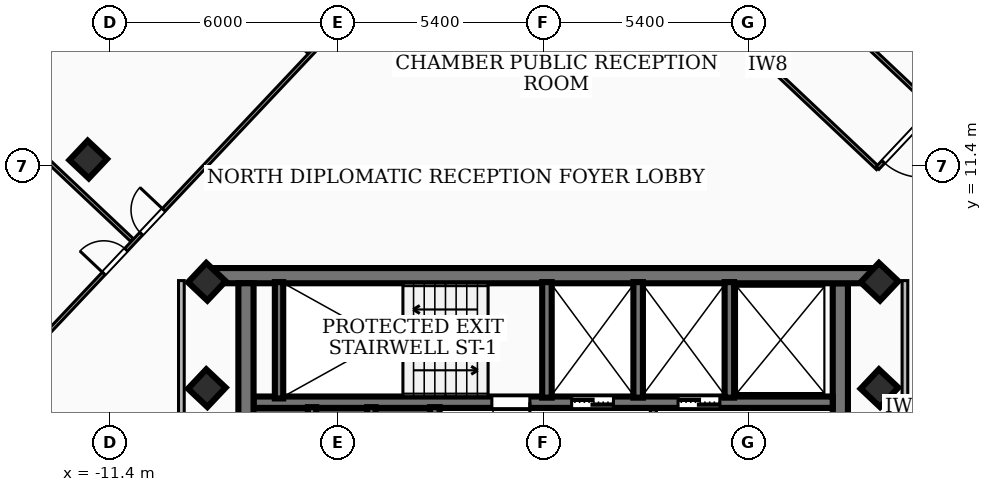
"""IFC4 building model, lengths in metres.
Left out: names, types, materials, properties, quantities, classifications, styles, units other than length and angle.
Written with IfcOpenShell. Run it as: python <this file> out.ifc"""

import sys

from ifc_helpers import new_model, si_unit, direction, frame, frame_2d, origin, origin_2d, place, context, subcontext, project, spatial, rectangle, extrude, element, fill, save


model = new_model("IFC4")
c1 = context("Model", 3, precision=1e-05, world=origin(), true_north=direction((0.0, 1.0)))
c2 = subcontext(c1, "Body", "Model", "MODEL_VIEW")
j1 = project(units=[si_unit("LENGTHUNIT", "METRE"), si_unit("PLANEANGLEUNIT", "RADIAN")], contexts=[c1])
p1 = place(None, origin())
s1 = spatial("IfcSite", under=j1, at=p1, CompositionType="ELEMENT")
p2 = place(p1, origin())
s2 = spatial("IfcBuilding", under=s1, at=p2, CompositionType="ELEMENT")
p3 = place(p2, frame((0.0, 0.0, 247.5)))
s3 = spatial("IfcBuildingStorey", under=s2, at=p3, CompositionType="ELEMENT", Elevation=247.5)
p4 = place(p3, frame((-8.78, 8.51, 0.0), z_axis=(0.0, 0.0, 1.0), x_axis=(1.0, 0.0, 0.0)))
e1 = element("IfcWall", 1, at=p4, inside=s3, PredefinedType="SHEAR", context=c2, shape_type="SweptSolid", body=[
    extrude(rectangle(XDim=17.56, YDim=0.4, at=frame_2d((8.78, 0.0))), origin(), (0.0, 0.0, 1.0), 3.16),
])
for number, where, z_axis, x_axis in (
    (2, (-7.82, 1.95, 0.0), (0.0, 0.0, 1.0), (0.0, 1.0, 0.0)),
    (3, (7.82, 8.31, 0.0), (0.0, 0.0, 1.0), (0.0, -1.0, 0.0)),
):
    element("IfcWall", number, at=place(p3, frame(where, z_axis=z_axis, x_axis=x_axis)), inside=s3, PredefinedType="SHEAR", context=c2, shape_type="SweptSolid", body=[
        extrude(rectangle(XDim=6.36, YDim=0.4, at=frame_2d((3.18, 0.0))), origin(), (0.0, 0.0, 1.0), 3.16),
    ])
p5 = place(p3, frame((7.62, 5.18, 0.0), z_axis=(0.0, 0.0, 1.0), x_axis=(-1.0, 0.0, 0.0)))
e4 = element("IfcWall", 4, at=p5, inside=s3, PredefinedType="SOLIDWALL", context=c2, shape_type="SweptSolid", body=[
    extrude(rectangle(XDim=15.24, YDim=0.3, at=frame_2d((7.62, 0.0))), origin(), (0.0, 0.0, 1.0), 3.16),
])
p6 = place(p5, frame((5.77, 0.0, 0.0)))
e5 = element("IfcOpeningElement", 5, at=p6, cuts=e4, PredefinedType="OPENING", context=c2, shape_type="SweptSolid", body=[
    extrude(rectangle(XDim=1.1, YDim=2.15, at=frame_2d((0.55, 1.075))), frame((0.0, 0.16, 0.0), z_axis=(0.0, -1.0, 0.0), x_axis=(1.0, 0.0, 0.0)), (0.0, 0.0, 1.0), 0.32),
])
p7 = place(p5, frame((2.97, 0.0, 0.0)))
e6 = element("IfcOpeningElement", 6, at=p7, cuts=e4, PredefinedType="OPENING", context=c2, shape_type="SweptSolid", body=[
    extrude(rectangle(XDim=1.1, YDim=2.15, at=frame_2d((0.55, 1.075))), frame((0.0, 0.16, 0.0), z_axis=(0.0, -1.0, 0.0), x_axis=(1.0, 0.0, 0.0)), (0.0, 0.0, 1.0), 0.32),
])
p8 = place(p5, frame((7.97, 0.0, 0.0)))
e7 = element("IfcOpeningElement", 7, at=p8, cuts=e4, PredefinedType="OPENING", context=c2, shape_type="SweptSolid", body=[
    extrude(rectangle(XDim=1.0, YDim=2.1, at=frame_2d((0.5, 1.05))), frame((0.0, 0.16, 0.0), z_axis=(0.0, -1.0, 0.0), x_axis=(1.0, 0.0, 0.0)), (0.0, 0.0, 1.0), 0.32),
])
p9 = place(p3, frame((-6.95, 5.28, 0.0), z_axis=(0.0, 0.0, 1.0), x_axis=(0.0, 1.0, 0.0)))
e8 = element("IfcWall", 8, at=p9, inside=s3, PredefinedType="SOLIDWALL", context=c2, shape_type="SweptSolid", body=[
    extrude(rectangle(XDim=3.06, YDim=0.22, at=frame_2d((1.53, 0.0))), origin(), (0.0, 0.0, 1.0), 3.16),
])
for number, where, z_axis, x_axis in (
    (9, (0.1, 5.3, 0.0), (0.0, 0.0, 1.0), (0.0, 1.0, 0.0)),
    (10, (2.5, 5.3, 0.0), (0.0, 0.0, 1.0), (0.0, 1.0, 0.0)),
    (11, (4.9, 5.3, 0.0), (0.0, 0.0, 1.0), (0.0, 1.0, 0.0)),
):
    element("IfcWall", number, at=place(p3, frame(where, z_axis=z_axis, x_axis=x_axis)), inside=s3, PredefinedType="SOLIDWALL", context=c2, shape_type="SweptSolid", body=[
        extrude(rectangle(XDim=3.04, YDim=0.25, at=frame_2d((1.52, 0.0))), origin(), (0.0, 0.0, 1.0), 3.16),
    ])
p10 = place(p3, frame((-2.85, 1.98, 0.0), z_axis=(0.0, 0.0, 1.0), x_axis=(0.0, 1.0, 0.0)))
e12 = element("IfcWall", 12, at=p10, inside=s3, PredefinedType="SOLIDWALL", context=c2, shape_type="SweptSolid", body=[
    extrude(rectangle(XDim=3.07, YDim=0.25, at=frame_2d((1.535, 0.0))), origin(), (0.0, 0.0, 1.0), 3.16),
])
for number, where, z_axis, x_axis in (
    (13, (-6.08, 1.98, 0.0), (0.0, 0.0, 1.0), (0.0, 1.0, 0.0)),
    (14, (-4.52, 1.98, 0.0), (0.0, 0.0, 1.0), (0.0, 1.0, 0.0)),
):
    element("IfcWall", number, at=place(p3, frame(where, z_axis=z_axis, x_axis=x_axis)), inside=s3, PredefinedType="SOLIDWALL", context=c2, shape_type="SweptSolid", body=[
        extrude(rectangle(XDim=3.07, YDim=0.22, at=frame_2d((1.535, 0.0))), origin(), (0.0, 0.0, 1.0), 3.16),
    ])
for number, where, z_axis, x_axis in (
    (15, (-8.85, 5.55, 0.0), (0.0, 0.0, 1.0), (0.686, 0.728, 0.0)),
    (16, (8.85, 5.55, 0.0), (0.0, 0.0, 1.0), (0.686, 0.728, 0.0)),
    (17, (-8.85, 8.35, 0.0), (0.0, 0.0, 1.0), (0.686, 0.728, 0.0)),
    (18, (8.85, 8.35, 0.0), (0.0, 0.0, 1.0), (0.686, 0.728, 0.0)),
    (19, (-11.971, 11.566, 0.0), (0.0, 0.0, 1.0), (0.686, 0.728, 0.0)),
):
    element("IfcColumn", number, at=place(p3, frame(where, z_axis=z_axis, x_axis=x_axis)), inside=s3, PredefinedType="COLUMN", context=c2, shape_type="SweptSolid", body=[
        extrude(rectangle(XDim=0.7, YDim=0.7, at=origin_2d()), origin(), (0.0, 0.0, 1.0), 3.42),
    ])
p11 = place(p3, frame((-8.782, 16.941, 0.0), z_axis=(0.0, 0.0, 1.0), x_axis=(0.727388601412, -0.686225781019, 0.0)))
e20 = element("IfcWall", 20, at=p11, inside=s3, PredefinedType="SOLIDWALL", context=c2, shape_type="SweptSolid", body=[
    extrude(rectangle(XDim=3.642, YDim=0.2, at=frame_2d((1.821, 0.0))), origin(), (0.0, 0.0, 1.0), 3.16),
])
p12 = place(p3, frame((-6.246, 14.439, 0.0), z_axis=(0.0, 0.0, 1.0), x_axis=(0.686109803758, 0.727497998064, 0.0)))
e21 = element("IfcWall", 21, at=p12, inside=s3, PredefinedType="SOLIDWALL", context=c2, shape_type="SweptSolid", body=[
    extrude(rectangle(XDim=6.742, YDim=0.2, at=frame_2d((3.371, 0.0))), origin(), (0.0, 0.0, 1.0), 3.16),
])
p13 = place(p3, frame((2.9, 2.04, 0.0), z_axis=(0.0, 0.0, 1.0), x_axis=(0.0, 1.0, 0.0)))
e22 = element("IfcWall", 22, at=p13, inside=s3, PredefinedType="PARTITIONING", context=c2, shape_type="SweptSolid", body=[
    extrude(rectangle(XDim=2.94, YDim=0.16, at=frame_2d((1.47, 0.0))), origin(), (0.0, 0.0, 1.0), 2.39),
])
p14 = place(p13, frame((1.82, 0.0, 0.0)))
e23 = element("IfcOpeningElement", 23, at=p14, cuts=e22, PredefinedType="OPENING", context=c2, shape_type="SweptSolid", body=[
    extrude(rectangle(XDim=0.9, YDim=2.06, at=frame_2d((0.45, 1.03))), frame((0.0, 0.09, 0.0), z_axis=(0.0, -1.0, 0.0), x_axis=(1.0, 0.0, 0.0)), (0.0, 0.0, 1.0), 0.18),
])
p15 = place(p3, frame((-9.52, 1.75, 0.0), z_axis=(0.0, 0.0, 1.0), x_axis=(0.0, 1.0, 0.0)))
e24 = element("IfcWall", 24, at=p15, inside=s3, PredefinedType="PARTITIONING", context=c2, shape_type="SweptSolid", body=[
    extrude(rectangle(XDim=6.63, YDim=0.15, at=frame_2d((3.315, 0.0))), origin(), (0.0, 0.0, 1.0), 2.53),
])
p16 = place(p3, frame((9.52, 1.75, 0.0), z_axis=(0.0, 0.0, 1.0), x_axis=(0.0, 1.0, 0.0)))
e25 = element("IfcWall", 25, at=p16, inside=s3, PredefinedType="PARTITIONING", context=c2, shape_type="SweptSolid", body=[
    extrude(rectangle(XDim=6.63, YDim=0.15, at=frame_2d((3.315, 0.0))), origin(), (0.0, 0.0, 1.0), 3.16),
])
p17 = place(p3, frame((-0.397, 13.54, 0.0), z_axis=(0.0, 0.0, 1.0), x_axis=(-0.029263699144, 0.999571726247, 0.0)))
e26 = element("IfcWall", 26, at=p17, inside=s3, PredefinedType="PARTITIONING", context=c2, shape_type="SweptSolid", body=[
    extrude(rectangle(XDim=6.149, YDim=0.1, at=frame_2d((3.074, 0.0))), origin(), (0.0, 0.0, 1.0), 3.16),
])
p18 = place(p3, frame((8.807, 11.336, 0.0), z_axis=(0.0, 0.0, 1.0), x_axis=(-0.727546923281, 0.68605792352, 0.0)))
e27 = element("IfcWall", 27, at=p18, inside=s3, PredefinedType="PARTITIONING", context=c2, shape_type="SweptSolid", body=[
    extrude(rectangle(XDim=7.95, YDim=0.1, at=frame_2d((3.975, 0.0))), origin(), (0.0, 0.0, 1.0), 3.16),
])
p19 = place(p3, frame((10.282, 12.915, 0.0), z_axis=(0.0, 0.0, 1.0), x_axis=(-0.685949623464, -0.727649032205, 0.0)))
e28 = element("IfcWall", 28, at=p19, inside=s3, PredefinedType="PARTITIONING", context=c2, shape_type="SweptSolid", body=[
    extrude(rectangle(XDim=2.16, YDim=0.1, at=frame_2d((1.08, 0.0))), origin(), (0.0, 0.0, 1.0), 2.53),
])
p20 = place(p19, frame((0.44, 0.0, 0.0)))
e29 = element("IfcOpeningElement", 29, at=p20, cuts=e28, PredefinedType="OPENING", context=c2, shape_type="SweptSolid", body=[
    extrude(rectangle(XDim=1.5, YDim=2.12, at=frame_2d((0.75, 1.06))), frame((0.0, 0.06, 0.0), z_axis=(0.0, -1.0, 0.0), x_axis=(1.0, 0.0, 0.0)), (0.0, 0.0, 1.0), 0.12),
])
p21 = place(p3, frame((6.75, 16.246, 0.0), z_axis=(0.0, 0.0, 1.0), x_axis=(0.727488049341, -0.686120352464, 0.0)))
e30 = element("IfcWall", 30, at=p21, inside=s3, PredefinedType="PARTITIONING", context=c2, shape_type="SweptSolid", body=[
    extrude(rectangle(XDim=12.47, YDim=0.1, at=frame_2d((6.235, 0.0))), origin(), (0.0, 0.0, 1.0), 2.53),
])
p22 = place(p21, frame((6.155, 0.0, 0.0)))
e31 = element("IfcOpeningElement", 31, at=p22, cuts=e30, PredefinedType="OPENING", context=c2, shape_type="SweptSolid", body=[
    extrude(rectangle(XDim=0.86, YDim=2.04, at=frame_2d((0.43, 1.02))), frame((0.0, 0.06, 0.0), z_axis=(0.0, -1.0, 0.0), x_axis=(1.0, 0.0, 0.0)), (0.0, 0.0, 1.0), 0.12),
])
p23 = place(p21, frame((4.955, 0.0, 0.0)))
e32 = element("IfcOpeningElement", 32, at=p23, cuts=e30, PredefinedType="OPENING", context=c2, shape_type="SweptSolid", body=[
    extrude(rectangle(XDim=0.86, YDim=2.04, at=frame_2d((0.43, 1.02))), frame((0.0, 0.06, 0.0), z_axis=(0.0, -1.0, 0.0), x_axis=(1.0, 0.0, 0.0)), (0.0, 0.0, 1.0), 0.12),
])
p24 = place(p3, frame((-10.817, 9.445, 0.0), z_axis=(0.0, 0.0, 1.0), x_axis=(-0.727564075469, 0.686039733606, 0.0)))
e33 = element("IfcWall", 33, at=p24, inside=s3, PredefinedType="PARTITIONING", context=c2, shape_type="SweptSolid", body=[
    extrude(rectangle(XDim=5.086, YDim=0.1, at=frame_2d((2.543, 0.0))), origin(), (0.0, 0.0, 1.0), 3.16),
])
p25 = place(p3, frame((-17.271, 2.514, 0.0), z_axis=(0.0, 0.0, 1.0), x_axis=(0.686068145865, 0.727537283739, 0.0)))
e34 = element("IfcWall", 34, at=p25, inside=s3, PredefinedType="PARTITIONING", context=c2, shape_type="SweptSolid", body=[
    extrude(rectangle(XDim=20.04, YDim=0.1, at=frame_2d((10.02, 0.0))), origin(), (0.0, 0.0, 1.0), 2.53),
])
p26 = place(p25, frame((9.76, 0.0, 0.0)))
e35 = element("IfcOpeningElement", 35, at=p26, cuts=e34, PredefinedType="OPENING", context=c2, shape_type="SweptSolid", body=[
    extrude(rectangle(XDim=0.86, YDim=2.04, at=frame_2d((0.43, 1.02))), frame((0.0, 0.06, 0.0), z_axis=(0.0, -1.0, 0.0), x_axis=(1.0, 0.0, 0.0)), (0.0, 0.0, 1.0), 0.12),
])
p27 = place(p25, frame((8.32, 0.0, 0.0)))
e36 = element("IfcOpeningElement", 36, at=p27, cuts=e34, PredefinedType="OPENING", context=c2, shape_type="SweptSolid", body=[
    extrude(rectangle(XDim=0.86, YDim=2.04, at=frame_2d((0.43, 1.02))), frame((0.0, 0.06, 0.0), z_axis=(0.0, -1.0, 0.0), x_axis=(1.0, 0.0, 0.0)), (0.0, 0.0, 1.0), 0.12),
])
p28 = place(p6, origin())
e37 = element("IfcDoor", 37, at=p28, inside=s3, OperationType="DOUBLE_DOOR_SLIDING", PredefinedType="DOOR", context=c2, shape_type="SweptSolid", body=[
    extrude(rectangle(XDim=1.1, YDim=2.15, at=frame_2d((0.55, 1.075))), frame((0.0, 0.025, 0.0), z_axis=(0.0, -1.0, 0.0), x_axis=(1.0, 0.0, 0.0)), (0.0, 0.0, 1.0), 0.05),
])
fill(e5, e37)
p29 = place(p7, origin())
e38 = element("IfcDoor", 38, at=p29, inside=s3, OperationType="DOUBLE_DOOR_SLIDING", PredefinedType="DOOR", context=c2, shape_type="SweptSolid", body=[
    extrude(rectangle(XDim=1.1, YDim=2.15, at=frame_2d((0.55, 1.075))), frame((0.0, 0.025, 0.0), z_axis=(0.0, -1.0, 0.0), x_axis=(1.0, 0.0, 0.0)), (0.0, 0.0, 1.0), 0.05),
])
fill(e6, e38)
p30 = place(p8, origin())
e39 = element("IfcDoor", 39, at=p30, inside=s3, OperationType="SINGLE_SWING_LEFT", PredefinedType="DOOR", context=c2, shape_type="SweptSolid", body=[
    extrude(rectangle(XDim=1.0, YDim=2.1, at=frame_2d((0.5, 1.05))), frame((0.0, 0.025, 0.0), z_axis=(0.0, -1.0, 0.0), x_axis=(1.0, 0.0, 0.0)), (0.0, 0.0, 1.0), 0.05),
])
fill(e7, e39)
p31 = place(p20, origin())
e40 = element("IfcDoor", 40, at=p31, inside=s3, OperationType="SINGLE_SWING_LEFT", PredefinedType="DOOR", context=c2, shape_type="SweptSolid", body=[
    extrude(rectangle(XDim=1.5, YDim=2.12, at=frame_2d((0.75, 1.06))), frame((0.0, 0.025, 0.0), z_axis=(0.0, -1.0, 0.0), x_axis=(1.0, 0.0, 0.0)), (0.0, 0.0, 1.0), 0.05),
])
fill(e29, e40)
p32 = place(p26, origin())
e41 = element("IfcDoor", 41, at=p32, inside=s3, OperationType="SINGLE_SWING_RIGHT", PredefinedType="DOOR", context=c2, shape_type="SweptSolid", body=[
    extrude(rectangle(XDim=0.86, YDim=2.04, at=frame_2d((0.43, 1.02))), frame((0.0, 0.025, 0.0), z_axis=(0.0, -1.0, 0.0), x_axis=(1.0, 0.0, 0.0)), (0.0, 0.0, 1.0), 0.05),
])
fill(e35, e41)
p33 = place(p27, origin())
e42 = element("IfcDoor", 42, at=p33, inside=s3, OperationType="SINGLE_SWING_LEFT", PredefinedType="DOOR", context=c2, shape_type="SweptSolid", body=[
    extrude(rectangle(XDim=0.86, YDim=2.04, at=frame_2d((0.43, 1.02))), frame((0.0, 0.025, 0.0), z_axis=(0.0, -1.0, 0.0), x_axis=(1.0, 0.0, 0.0)), (0.0, 0.0, 1.0), 0.05),
])
fill(e36, e42)
save(model, sys.argv[1])
